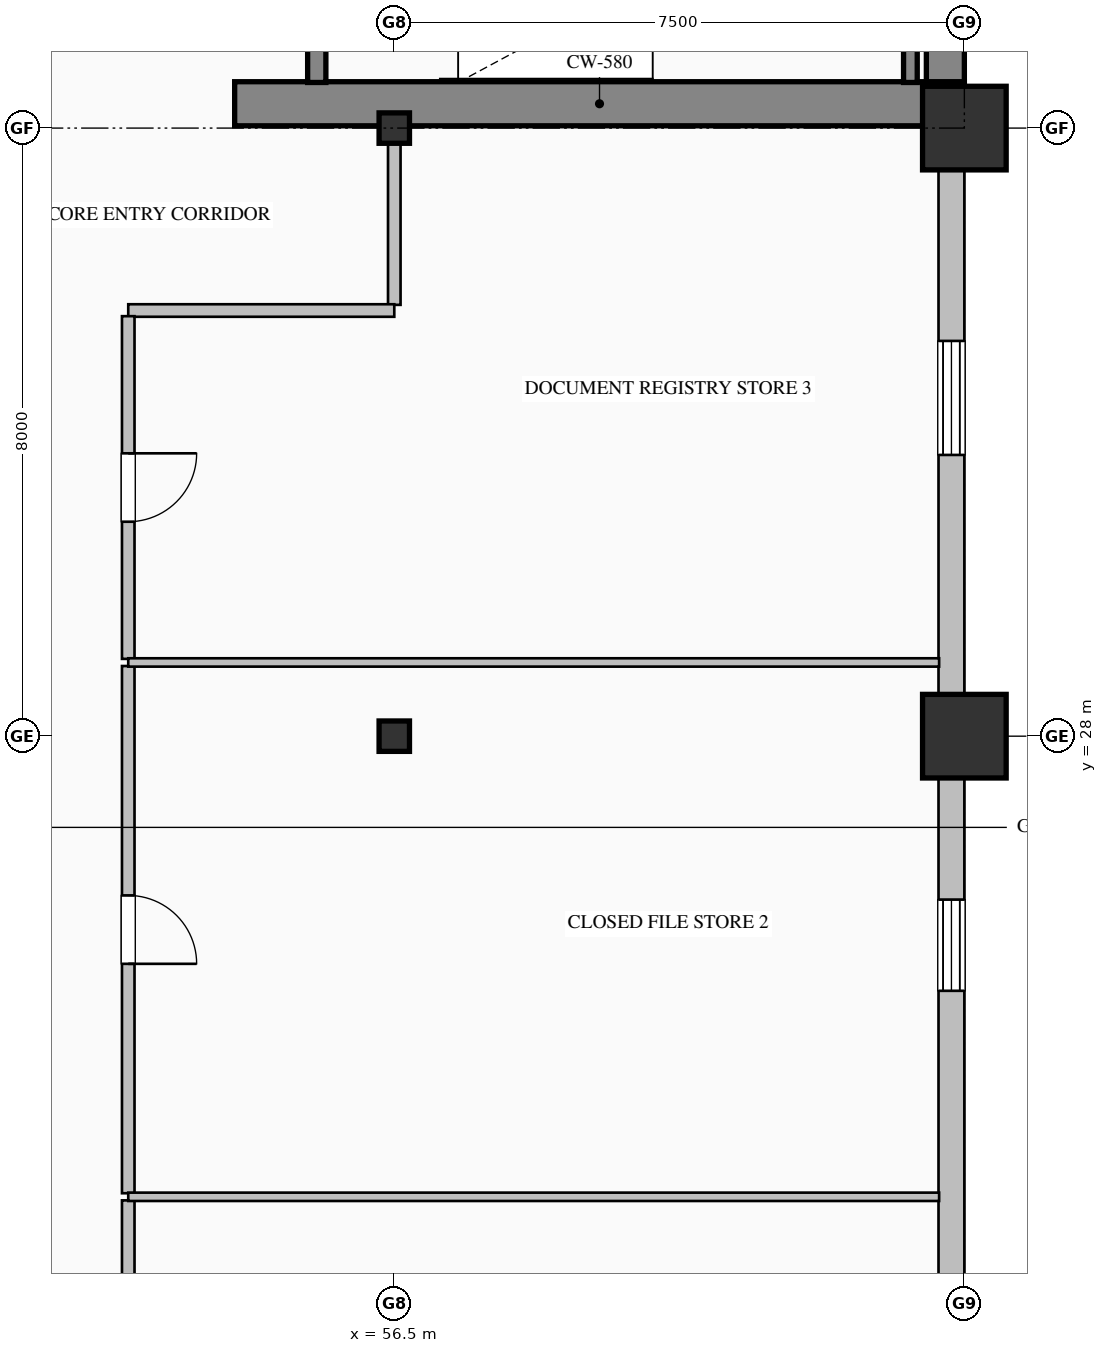
"""IFC4 building model, lengths in metres.
Left out: names, types, materials, properties, quantities, classifications, styles, units other than length and angle.
Written with IfcOpenShell. Run it as: python <this file> out.ifc"""

import sys

from ifc_helpers import new_model, si_unit, direction, frame, frame_2d, origin, origin_2d, place, context, subcontext, project, spatial, rectangle, hollow_rectangle, i_section, extrude, element, fill, save


model = new_model("IFC4")
c1 = context("Model", 3, precision=1e-05, world=origin(), true_north=direction((0.0, 1.0)))
c2 = subcontext(c1, "Body", "Model", "MODEL_VIEW")
j1 = project(units=[si_unit("LENGTHUNIT", "METRE"), si_unit("PLANEANGLEUNIT", "RADIAN")], contexts=[c1])
p1 = place(None, origin())
s1 = spatial("IfcSite", under=j1, at=p1, CompositionType="ELEMENT")
p2 = place(p1, origin())
s2 = spatial("IfcBuilding", under=s1, at=p2, CompositionType="ELEMENT")
p3 = place(p2, frame((0.0, 0.0, 187.0)))
s3 = spatial("IfcBuildingStorey", under=s2, at=p3, CompositionType="ELEMENT", Elevation=187.0)
p4 = place(p3, frame((63.75, 36.32, 0.0), z_axis=(0.0, 0.0, 1.0), x_axis=(0.0, 1.0, 0.0)))
e1 = element("IfcWall", 1, at=p4, inside=s3, PredefinedType="SHEAR", context=c2, shape_type="SweptSolid", body=[
    extrude(rectangle(XDim=15.18, YDim=0.5, at=frame_2d((7.59, 0.0))), origin(), (0.0, 0.0, 1.0), 3.765),
])
p5 = place(p3, frame((54.4, 36.32, 0.0), z_axis=(0.0, 0.0, 1.0), x_axis=(1.0, 0.0, 0.0)))
e2 = element("IfcWall", 2, at=p5, inside=s3, PredefinedType="SHEAR", context=c2, shape_type="SweptSolid", body=[
    extrude(rectangle(XDim=9.6, YDim=0.58, at=frame_2d((4.8, 0.0))), origin(), (0.0, 0.0, 1.0), 4.0),
])
for number, where, z_axis, x_axis in (
    (3, (56.5, 28.0, 0.0), (0.0, 0.0, 1.0), (1.0, 0.0, 0.0)),
    (4, (56.5, 36.0, 0.0), (0.0, 0.0, 1.0), (1.0, 0.0, 0.0)),
):
    element("IfcColumn", number, at=place(p3, frame(where, z_axis=z_axis, x_axis=x_axis)), inside=s3, PredefinedType="COLUMN", context=c2, shape_type="SweptSolid", body=[
        extrude(i_section(OverallWidth=0.4, OverallDepth=0.4, WebThickness=0.013, FlangeThickness=0.021, FilletRadius=0.022, at=origin_2d()), origin(), (0.0, 0.0, 1.0), 4.0),
    ])
for number, where, z_axis, x_axis in (
    (5, (64.0, 28.0, 0.0), (0.0, 0.0, 1.0), (1.0, 0.0, 0.0)),
    (6, (64.0, 36.0, 0.0), (0.0, 0.0, 1.0), (1.0, 0.0, 0.0)),
):
    element("IfcColumn", number, at=place(p3, frame(where, z_axis=z_axis, x_axis=x_axis)), inside=s3, PredefinedType="COLUMN", context=c2, shape_type="SweptSolid", body=[
        extrude(hollow_rectangle(XDim=1.1, YDim=1.1, WallThickness=0.04, at=origin_2d()), origin(), (0.0, 0.0, 1.0), 4.0),
    ])
p6 = place(p3, frame((63.83, 36.05, 0.0), z_axis=(0.0, 0.0, 1.0), x_axis=(0.0, -1.0, 0.0)))
e7 = element("IfcWall", 7, at=p6, inside=s3, PredefinedType="SOLIDWALL", context=c2, shape_type="SweptSolid", body=[
    extrude(rectangle(XDim=28.05, YDim=0.34, at=frame_2d((14.025, 0.0))), origin(), (0.0, 0.0, 1.0), 3.265),
])
p7 = place(p6, frame((2.85, 0.0, 0.85)))
e8 = element("IfcOpeningElement", 8, at=p7, cuts=e7, PredefinedType="OPENING", context=c2, shape_type="SweptSolid", body=[
    extrude(rectangle(XDim=1.5, YDim=1.95, at=frame_2d((0.75, 0.975))), frame((0.0, 0.18, 0.0), z_axis=(0.0, -1.0, 0.0), x_axis=(1.0, 0.0, 0.0)), (0.0, 0.0, 1.0), 0.36),
])
p8 = place(p6, frame((10.2, 0.0, 0.7)))
e9 = element("IfcOpeningElement", 9, at=p8, cuts=e7, PredefinedType="OPENING", context=c2, shape_type="SweptSolid", body=[
    extrude(rectangle(XDim=1.2, YDim=1.85, at=frame_2d((0.6, 0.925))), frame((0.0, 0.18, 0.0), z_axis=(0.0, -1.0, 0.0), x_axis=(1.0, 0.0, 0.0)), (0.0, 0.0, 1.0), 0.36),
])
p9 = place(p6, frame((24.45, 0.0, 0.85)))
e10 = element("IfcOpeningElement", 10, at=p9, cuts=e7, PredefinedType="OPENING", context=c2, shape_type="SweptSolid", body=[
    extrude(rectangle(XDim=1.5, YDim=1.95, at=frame_2d((0.75, 0.975))), frame((0.0, 0.18, 0.0), z_axis=(0.0, -1.0, 0.0), x_axis=(1.0, 0.0, 0.0)), (0.0, 0.0, 1.0), 0.36),
])
p10 = place(p3, frame((55.48, 39.75, 0.0), z_axis=(0.0, 0.0, 1.0), x_axis=(0.0, -1.0, 0.0)))
e11 = element("IfcWall", 11, at=p10, inside=s3, PredefinedType="SOLIDWALL", context=c2, shape_type="SweptSolid", body=[
    extrude(rectangle(XDim=3.15, YDim=0.24, at=frame_2d((1.575, 0.0))), origin(), (0.0, 0.0, 1.0), 4.0),
])
p11 = place(p10, frame((1.0, 0.0, 0.0)))
e12 = element("IfcOpeningElement", 12, at=p11, cuts=e11, PredefinedType="OPENING", context=c2, shape_type="SweptSolid", body=[
    extrude(rectangle(XDim=1.15, YDim=2.2, at=frame_2d((0.575, 1.1))), frame((0.0, 0.13, 0.0), z_axis=(0.0, -1.0, 0.0), x_axis=(1.0, 0.0, 0.0)), (0.0, 0.0, 1.0), 0.26),
])
p12 = place(p3, frame((63.29, 36.6, 0.0), z_axis=(0.0, 0.0, 1.0), x_axis=(0.0, 1.0, 0.0)))
e13 = element("IfcWall", 13, at=p12, inside=s3, PredefinedType="SOLIDWALL", context=c2, shape_type="SweptSolid", body=[
    extrude(rectangle(XDim=3.15, YDim=0.18, at=frame_2d((1.575, 0.0))), origin(), (0.0, 0.0, 1.0), 4.0),
])
p13 = place(p3, frame((56.5, 36.0, 0.0), z_axis=(0.0, 0.0, 1.0), x_axis=(0.0, -1.0, 0.0)))
e14 = element("IfcWall", 14, at=p13, inside=s3, PredefinedType="PARTITIONING", context=c2, shape_type="SweptSolid", body=[
    extrude(rectangle(XDim=2.325, YDim=0.165, at=frame_2d((1.163, 0.0))), origin(), (0.0, 0.0, 1.0), 3.157),
])
p14 = place(p3, frame((56.5, 33.6, 0.0), z_axis=(0.0, 0.0, 1.0), x_axis=(-1.0, 0.0, 0.0)))
e15 = element("IfcWall", 15, at=p14, inside=s3, PredefinedType="PARTITIONING", context=c2, shape_type="SweptSolid", body=[
    extrude(rectangle(XDim=3.5, YDim=0.165, at=frame_2d((1.75, 0.0))), origin(), (0.0, 0.0, 1.0), 3.765),
])
p15 = place(p3, frame((53.0, 21.893, 0.0), z_axis=(0.0, 0.0, 1.0), x_axis=(0.0, -1.0, 0.0)))
e16 = element("IfcWall", 16, at=p15, inside=s3, PredefinedType="PARTITIONING", context=c2, shape_type="SweptSolid", body=[
    extrude(rectangle(XDim=7.119, YDim=0.165, at=frame_2d((3.559, 0.0))), origin(), (0.0, 0.0, 1.0), 3.765),
])
p16 = place(p3, frame((53.0, 28.923, 0.0), z_axis=(0.0, 0.0, 1.0), x_axis=(0.0, -1.0, 0.0)))
e17 = element("IfcWall", 17, at=p16, inside=s3, PredefinedType="PARTITIONING", context=c2, shape_type="SweptSolid", body=[
    extrude(rectangle(XDim=6.936, YDim=0.165, at=frame_2d((3.468, 0.0))), origin(), (0.0, 0.0, 1.0), 3.765),
])
p17 = place(p16, frame((3.018, 0.0, 0.0)))
e18 = element("IfcOpeningElement", 18, at=p17, cuts=e17, PredefinedType="OPENING", context=c2, shape_type="SweptSolid", body=[
    extrude(rectangle(XDim=0.9, YDim=2.15, at=frame_2d((0.45, 1.075))), frame((0.0, 0.093, 0.0), z_axis=(0.0, -1.0, 0.0), x_axis=(1.0, 0.0, 0.0)), (0.0, 0.0, 1.0), 0.185),
])
p18 = place(p3, frame((53.0, 33.525, 0.0), z_axis=(0.0, 0.0, 1.0), x_axis=(0.0, -1.0, 0.0)))
e19 = element("IfcWall", 19, at=p18, inside=s3, PredefinedType="PARTITIONING", context=c2, shape_type="SweptSolid", body=[
    extrude(rectangle(XDim=4.508, YDim=0.165, at=frame_2d((2.254, 0.0))), origin(), (0.0, 0.0, 1.0), 3.765),
])
p19 = place(p18, frame((1.804, 0.0, 0.0)))
e20 = element("IfcOpeningElement", 20, at=p19, cuts=e19, PredefinedType="OPENING", context=c2, shape_type="SweptSolid", body=[
    extrude(rectangle(XDim=0.9, YDim=2.15, at=frame_2d((0.45, 1.075))), frame((0.0, 0.093, 0.0), z_axis=(0.0, -1.0, 0.0), x_axis=(1.0, 0.0, 0.0)), (0.0, 0.0, 1.0), 0.185),
])
for number, where, z_axis, x_axis in (
    (21, (53.0, 21.94, 0.0), (0.0, 0.0, 1.0), (1.0, 0.0, 0.0)),
    (22, (53.0, 28.97, 0.0), (0.0, 0.0, 1.0), (1.0, 0.0, 0.0)),
):
    element("IfcWall", number, at=place(p3, frame(where, z_axis=z_axis, x_axis=x_axis)), inside=s3, PredefinedType="MOVABLE", context=c2, shape_type="SweptSolid", body=[
        extrude(rectangle(XDim=10.668, YDim=0.11, at=frame_2d((5.334, 0.0))), origin(), (0.0, 0.0, 1.0), 3.765),
    ])
p20 = place(p7, origin())
e23 = element("IfcWindow", 23, at=p20, inside=s3, PartitioningType="DOUBLE_PANEL_VERTICAL", PredefinedType="WINDOW", context=c2, shape_type="SweptSolid", body=[
    extrude(rectangle(XDim=1.5, YDim=1.95, at=frame_2d((0.75, 0.975))), frame((0.0, 0.15, 0.0), z_axis=(0.0, -1.0, 0.0), x_axis=(1.0, 0.0, 0.0)), (0.0, 0.0, 1.0), 0.06),
])
fill(e8, e23)
p21 = place(p8, origin())
e24 = element("IfcWindow", 24, at=p21, inside=s3, PartitioningType="DOUBLE_PANEL_VERTICAL", PredefinedType="WINDOW", context=c2, shape_type="SweptSolid", body=[
    extrude(rectangle(XDim=1.2, YDim=1.85, at=frame_2d((0.6, 0.925))), frame((0.0, 0.15, 0.0), z_axis=(0.0, -1.0, 0.0), x_axis=(1.0, 0.0, 0.0)), (0.0, 0.0, 1.0), 0.06),
])
fill(e9, e24)
p22 = place(p17, origin())
e25 = element("IfcDoor", 25, at=p22, inside=s3, OperationType="SINGLE_SWING_RIGHT", PredefinedType="DOOR", context=c2, shape_type="SweptSolid", body=[
    extrude(rectangle(XDim=0.9, YDim=2.15, at=frame_2d((0.45, 1.075))), frame((0.0, 0.025, 0.0), z_axis=(0.0, -1.0, 0.0), x_axis=(1.0, 0.0, 0.0)), (0.0, 0.0, 1.0), 0.05),
])
fill(e18, e25)
p23 = place(p19, origin())
e26 = element("IfcDoor", 26, at=p23, inside=s3, OperationType="SINGLE_SWING_LEFT", PredefinedType="DOOR", context=c2, shape_type="SweptSolid", body=[
    extrude(rectangle(XDim=0.9, YDim=2.15, at=frame_2d((0.45, 1.075))), frame((0.0, 0.025, 0.0), z_axis=(0.0, -1.0, 0.0), x_axis=(1.0, 0.0, 0.0)), (0.0, 0.0, 1.0), 0.05),
])
fill(e20, e26)
save(model, sys.argv[1])
